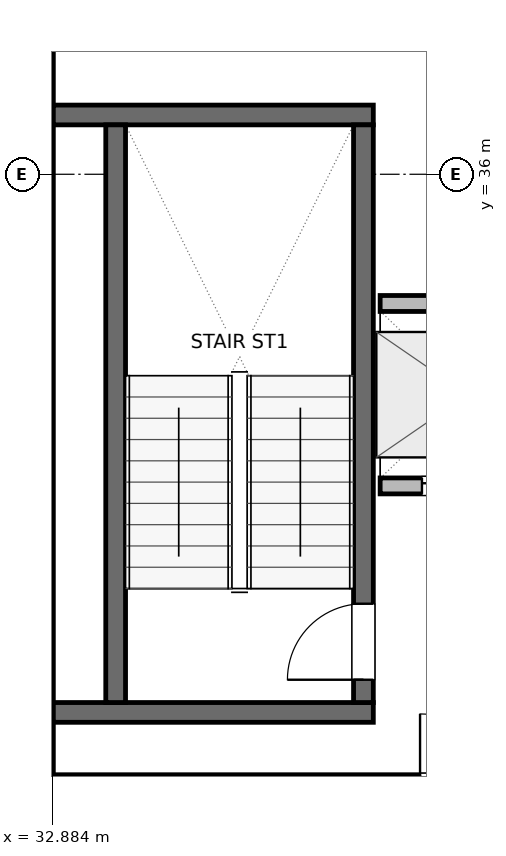
"""IFC4 building model, lengths in metres.
Left out: names, types, materials, properties, quantities, classifications, styles, units other than length and angle.
Written with IfcOpenShell. Run it as: python <this file> out.ifc"""

import sys

from ifc_helpers import new_model, si_unit, direction, frame, frame_2d, origin, place, context, subcontext, project, spatial, rectangle, extrude, element, fill, save


model = new_model("IFC4")
c1 = context("Model", 3, precision=1e-05, world=origin(), true_north=direction((0.0, 1.0)))
c2 = subcontext(c1, "Body", "Model", "MODEL_VIEW")
j1 = project(units=[si_unit("LENGTHUNIT", "METRE"), si_unit("PLANEANGLEUNIT", "RADIAN")], contexts=[c1])
p1 = place(None, origin())
s1 = spatial("IfcSite", under=j1, at=p1, CompositionType="ELEMENT")
p2 = place(p1, origin())
s2 = spatial("IfcBuilding", under=s1, at=p2, CompositionType="ELEMENT")
p3 = place(p2, frame((0.0, 0.0, 286.2)))
s3 = spatial("IfcBuildingStorey", under=s2, at=p3, CompositionType="ELEMENT", Elevation=286.2)
p4 = place(p3, frame((32.65, 27.6, 0.0), z_axis=(0.0, 0.0, 1.0), x_axis=(0.0, 1.0, 0.0)))
e1 = element("IfcWall", 1, at=p4, inside=s3, PredefinedType="SHEAR", context=c2, shape_type="SweptSolid", body=[
    extrude(rectangle(XDim=16.8, YDim=0.5, at=frame_2d((8.4, 0.0))), origin(), (0.0, 0.0, 1.0), 3.9),
])
p5 = place(p3, frame((32.65, 27.85, 0.0), z_axis=(0.0, 0.0, 1.0), x_axis=(1.0, 0.0, 0.0)))
e2 = element("IfcWall", 2, at=p5, inside=s3, PredefinedType="SHEAR", context=c2, shape_type="SweptSolid", body=[
    extrude(rectangle(XDim=9.5, YDim=0.5, at=frame_2d((4.75, 0.0))), origin(), (0.0, 0.0, 1.0), 3.9),
])
p6 = place(p5, frame((5.075, 0.0, 0.0)))
e3 = element("IfcOpeningElement", 3, at=p6, cuts=e2, PredefinedType="OPENING", context=c2, shape_type="SweptSolid", body=[
    extrude(rectangle(XDim=1.05, YDim=2.04, at=frame_2d((0.525, 1.02))), frame((0.0, 0.26, 0.0), z_axis=(0.0, -1.0, 0.0), x_axis=(1.0, 0.0, 0.0)), (0.0, 0.0, 1.0), 0.52),
])
for number, where, z_axis, x_axis in (
    (4, (32.9, 28.92, 0.0), (0.0, 0.0, 1.0), (1.0, 0.0, 0.0)),
    (5, (32.9, 36.78, 0.0), (0.0, 0.0, 1.0), (1.0, 0.0, 0.0)),
):
    element("IfcWall", number, at=place(p3, frame(where, z_axis=z_axis, x_axis=x_axis)), inside=s3, PredefinedType="SHEAR", context=c2, shape_type="SweptSolid", body=[
        extrude(rectangle(XDim=4.21, YDim=0.26, at=frame_2d((2.105, 0.0))), origin(), (0.0, 0.0, 1.0), 3.9),
    ])
p7 = place(p3, frame((33.72, 29.05, 0.0), z_axis=(0.0, 0.0, 1.0), x_axis=(0.0, 1.0, 0.0)))
e6 = element("IfcWall", 6, at=p7, inside=s3, PredefinedType="SHEAR", context=c2, shape_type="SweptSolid", body=[
    extrude(rectangle(XDim=7.6, YDim=0.26, at=frame_2d((3.8, 0.0))), origin(), (0.0, 0.0, 1.0), 3.9),
])
p8 = place(p3, frame((36.98, 29.05, 0.0), z_axis=(0.0, 0.0, 1.0), x_axis=(0.0, 1.0, 0.0)))
e7 = element("IfcWall", 7, at=p8, inside=s3, PredefinedType="SHEAR", context=c2, shape_type="SweptSolid", body=[
    extrude(rectangle(XDim=7.6, YDim=0.26, at=frame_2d((3.8, 0.0))), origin(), (0.0, 0.0, 1.0), 3.9),
])
p9 = place(p8, frame((0.3, 0.0, 0.0)))
e8 = element("IfcOpeningElement", 8, at=p9, cuts=e7, PredefinedType="OPENING", context=c2, shape_type="SweptSolid", body=[
    extrude(rectangle(XDim=1.0, YDim=2.04, at=frame_2d((0.5, 1.02))), frame((0.0, 0.14, 0.0), z_axis=(0.0, -1.0, 0.0), x_axis=(1.0, 0.0, 0.0)), (0.0, 0.0, 1.0), 0.28),
])
p10 = place(p3, frame((37.2, 31.9, 0.0), z_axis=(0.0, 0.0, 1.0), x_axis=(1.0, 0.0, 0.0)))
e9 = element("IfcWall", 9, at=p10, inside=s3, PredefinedType="PARTITIONING", context=c2, shape_type="SweptSolid", body=[
    extrude(rectangle(XDim=2.3, YDim=0.21, at=frame_2d((1.15, 0.0))), origin(), (0.0, 0.0, 1.0), 3.68),
])
p11 = place(p10, frame((0.55, 0.0, 0.0)))
e10 = element("IfcOpeningElement", 10, at=p11, cuts=e9, PredefinedType="OPENING", context=c2, shape_type="SweptSolid", body=[
    extrude(rectangle(XDim=1.2, YDim=2.04, at=frame_2d((0.6, 1.02))), frame((0.0, 0.115, 0.0), z_axis=(0.0, -1.0, 0.0), x_axis=(1.0, 0.0, 0.0)), (0.0, 0.0, 1.0), 0.23),
])
p12 = place(p3, frame((37.2, 34.3, 0.0), z_axis=(0.0, 0.0, 1.0), x_axis=(1.0, 0.0, 0.0)))
e11 = element("IfcWall", 11, at=p12, inside=s3, PredefinedType="PARTITIONING", context=c2, shape_type="SweptSolid", body=[
    extrude(rectangle(XDim=2.3, YDim=0.21, at=frame_2d((1.15, 0.0))), origin(), (0.0, 0.0, 1.0), 3.68),
])
p13 = place(p9, origin())
e12 = element("IfcDoor", 12, at=p13, inside=s3, OperationType="SINGLE_SWING_LEFT", PredefinedType="DOOR", context=c2, shape_type="SweptSolid", body=[
    extrude(rectangle(XDim=1.0, YDim=2.04, at=frame_2d((0.5, 1.02))), frame((0.0, 0.025, 0.0), z_axis=(0.0, -1.0, 0.0), x_axis=(1.0, 0.0, 0.0)), (0.0, 0.0, 1.0), 0.05),
])
fill(e8, e12)
p14 = place(p11, origin())
e13 = element("IfcDoor", 13, at=p14, inside=s3, OperationType="DOUBLE_DOOR_SLIDING", PredefinedType="DOOR", context=c2, shape_type="SweptSolid", body=[
    extrude(rectangle(XDim=1.2, YDim=2.04, at=frame_2d((0.6, 1.02))), frame((0.0, 0.025, 0.0), z_axis=(0.0, -1.0, 0.0), x_axis=(1.0, 0.0, 0.0)), (0.0, 0.0, 1.0), 0.05),
])
fill(e10, e13)
save(model, sys.argv[1])
